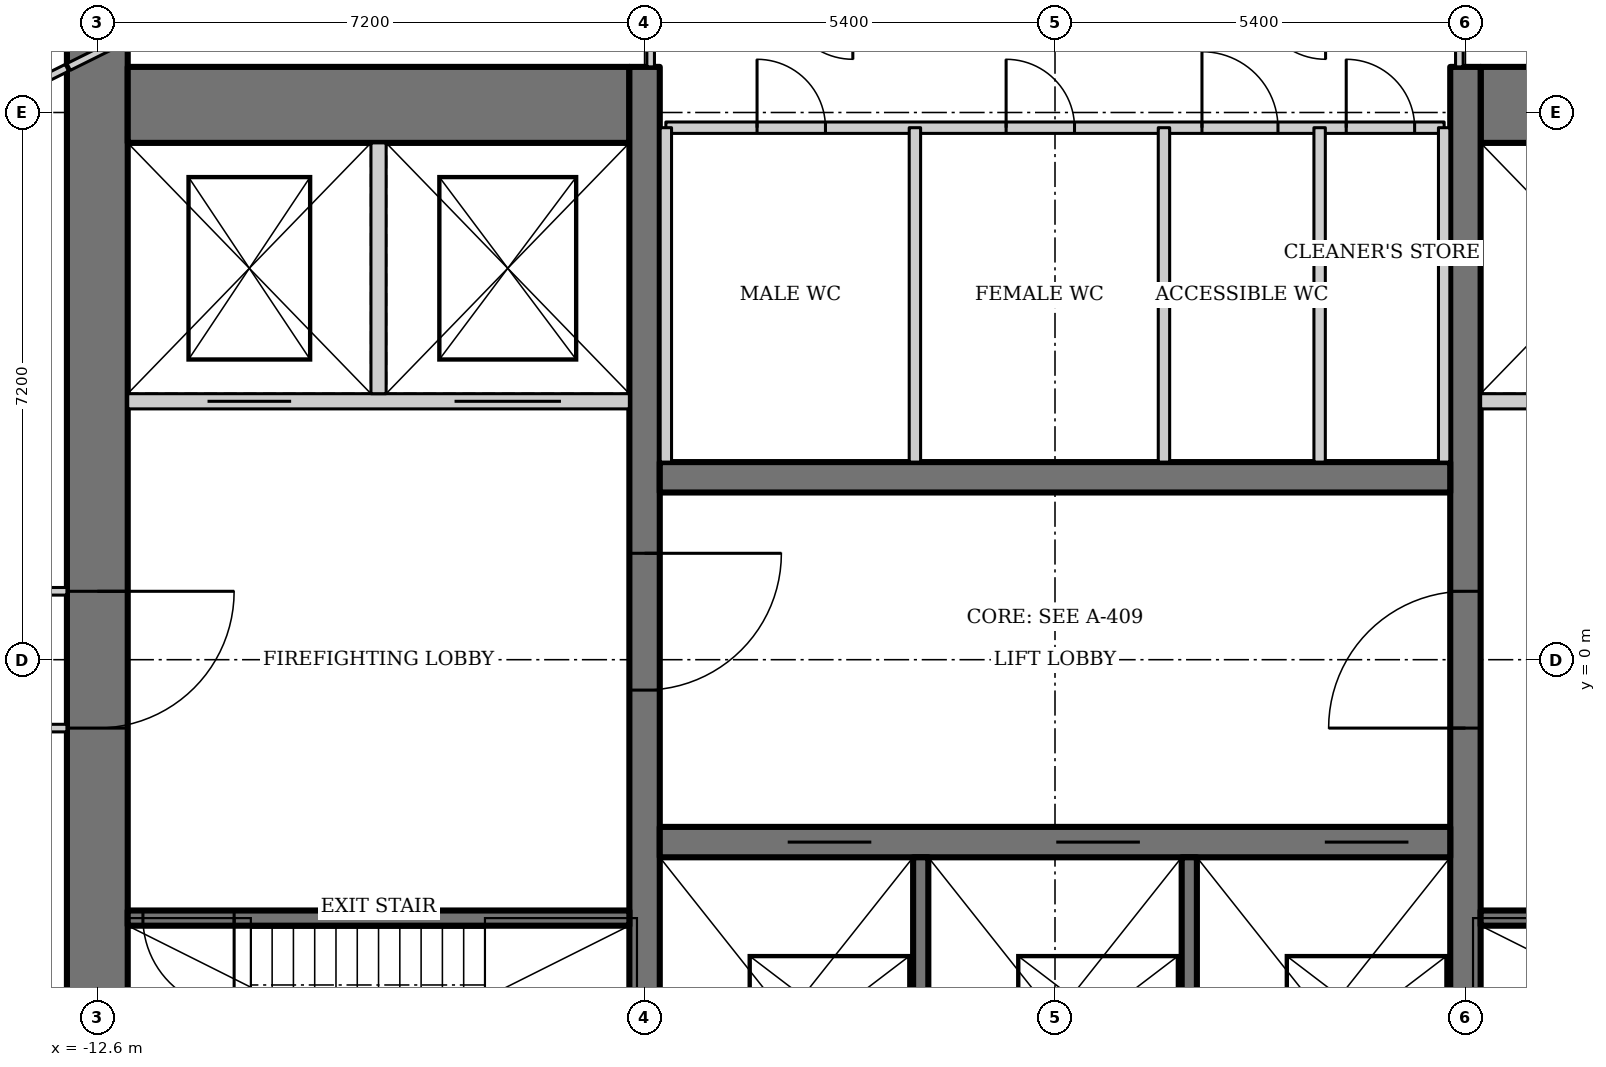
"""IFC4 building model, lengths in metres.
Left out: names, types, materials, properties, quantities, classifications, styles, units other than length and angle.
Written with IfcOpenShell. Run it as: python <this file> out.ifc"""

import sys

from ifc_helpers import new_model, si_unit, direction, frame, frame_2d, origin, place, context, subcontext, project, spatial, rectangle, extrude, element, fill, save


model = new_model("IFC4")
c1 = context("Model", 3, precision=1e-05, world=origin(), true_north=direction((0.0, 1.0)))
c2 = subcontext(c1, "Body", "Model", "MODEL_VIEW")
j1 = project(units=[si_unit("LENGTHUNIT", "METRE"), si_unit("PLANEANGLEUNIT", "RADIAN")], contexts=[c1])
p1 = place(None, origin())
s1 = spatial("IfcSite", under=j1, at=p1, CompositionType="ELEMENT")
p2 = place(p1, origin())
s2 = spatial("IfcBuilding", under=s1, at=p2, CompositionType="ELEMENT")
p3 = place(p2, frame((0.0, 0.0, 245.2)))
s3 = spatial("IfcBuildingStorey", under=s2, at=p3, CompositionType="ELEMENT", Elevation=245.2)
p4 = place(p3, frame((-12.6, 11.0, 0.0), z_axis=(0.0, 0.0, 1.0), x_axis=(0.0, -1.0, 0.0)))
e1 = element("IfcWall", 1, at=p4, inside=s3, PredefinedType="SHEAR", context=c2, shape_type="SweptSolid", body=[
    extrude(rectangle(XDim=22.0, YDim=0.8, at=frame_2d((11.0, 0.0))), origin(), (0.0, 0.0, 1.0), 4.2),
])
p5 = place(p4, frame((10.1, 0.0, 0.0)))
e2 = element("IfcOpeningElement", 2, at=p5, cuts=e1, PredefinedType="OPENING", context=c2, shape_type="SweptSolid", body=[
    extrude(rectangle(XDim=1.8, YDim=2.1, at=frame_2d((0.9, 1.05))), frame((0.0, 0.41, 0.0), z_axis=(0.0, -1.0, 0.0), x_axis=(1.0, 0.0, 0.0)), (0.0, 0.0, 1.0), 0.82),
])
for number, where, z_axis, x_axis in (
    (3, (12.2, 7.3, 0.0), (0.0, 0.0, 1.0), (-1.0, 0.0, 0.0)),
    (4, (-5.6, 7.3, 0.0), (0.0, 0.0, 1.0), (-1.0, 0.0, 0.0)),
):
    element("IfcWall", number, at=place(p3, frame(where, z_axis=z_axis, x_axis=x_axis)), inside=s3, PredefinedType="SHEAR", context=c2, shape_type="SweptSolid", body=[
        extrude(rectangle(XDim=6.6, YDim=1.0, at=frame_2d((3.3, 0.0))), origin(), (0.0, 0.0, 1.0), 4.2),
    ])
p6 = place(p3, frame((5.4, -6.8, 0.0), z_axis=(0.0, 0.0, 1.0), x_axis=(0.0, 1.0, 0.0)))
e5 = element("IfcWall", 5, at=p6, inside=s3, PredefinedType="SHEAR", context=c2, shape_type="SweptSolid", body=[
    extrude(rectangle(XDim=14.6, YDim=0.4, at=frame_2d((7.3, 0.0))), origin(), (0.0, 0.0, 1.0), 4.2),
])
p7 = place(p6, frame((5.9, 0.0, 0.0)))
e6 = element("IfcOpeningElement", 6, at=p7, cuts=e5, PredefinedType="OPENING", context=c2, shape_type="SweptSolid", body=[
    extrude(rectangle(XDim=1.8, YDim=2.1, at=frame_2d((0.9, 1.05))), frame((0.0, 0.21, 0.0), z_axis=(0.0, -1.0, 0.0), x_axis=(1.0, 0.0, 0.0)), (0.0, 0.0, 1.0), 0.42),
])
p8 = place(p3, frame((-5.4, 7.8, 0.0), z_axis=(0.0, 0.0, 1.0), x_axis=(0.0, -1.0, 0.0)))
e7 = element("IfcWall", 7, at=p8, inside=s3, PredefinedType="SHEAR", context=c2, shape_type="SweptSolid", body=[
    extrude(rectangle(XDim=14.6, YDim=0.4, at=frame_2d((7.3, 0.0))), origin(), (0.0, 0.0, 1.0), 4.2),
])
p9 = place(p8, frame((6.4, 0.0, 0.0)))
e8 = element("IfcOpeningElement", 8, at=p9, cuts=e7, PredefinedType="OPENING", context=c2, shape_type="SweptSolid", body=[
    extrude(rectangle(XDim=1.8, YDim=2.1, at=frame_2d((0.9, 1.05))), frame((0.0, 0.21, 0.0), z_axis=(0.0, -1.0, 0.0), x_axis=(1.0, 0.0, 0.0)), (0.0, 0.0, 1.0), 0.42),
])
p10 = place(p3, frame((-5.2, -2.4, 0.0), z_axis=(0.0, 0.0, 1.0), x_axis=(1.0, 0.0, 0.0)))
e9 = element("IfcWall", 9, at=p10, inside=s3, PredefinedType="SHEAR", context=c2, shape_type="SweptSolid", body=[
    extrude(rectangle(XDim=10.4, YDim=0.4, at=frame_2d((5.2, 0.0))), origin(), (0.0, 0.0, 1.0), 4.2),
])
p11 = place(p10, frame((1.683, 0.0, 0.0)))
e10 = element("IfcOpeningElement", 10, at=p11, cuts=e9, PredefinedType="OPENING", context=c2, shape_type="SweptSolid", body=[
    extrude(rectangle(XDim=1.1, YDim=2.2, at=frame_2d((0.55, 1.1))), frame((0.0, 0.21, 0.0), z_axis=(0.0, -1.0, 0.0), x_axis=(1.0, 0.0, 0.0)), (0.0, 0.0, 1.0), 0.42),
])
p12 = place(p10, frame((5.217, 0.0, 0.0)))
e11 = element("IfcOpeningElement", 11, at=p12, cuts=e9, PredefinedType="OPENING", context=c2, shape_type="SweptSolid", body=[
    extrude(rectangle(XDim=1.1, YDim=2.2, at=frame_2d((0.55, 1.1))), frame((0.0, 0.21, 0.0), z_axis=(0.0, -1.0, 0.0), x_axis=(1.0, 0.0, 0.0)), (0.0, 0.0, 1.0), 0.42),
])
p13 = place(p10, frame((8.75, 0.0, 0.0)))
e12 = element("IfcOpeningElement", 12, at=p13, cuts=e9, PredefinedType="OPENING", context=c2, shape_type="SweptSolid", body=[
    extrude(rectangle(XDim=1.1, YDim=2.2, at=frame_2d((0.55, 1.1))), frame((0.0, 0.21, 0.0), z_axis=(0.0, -1.0, 0.0), x_axis=(1.0, 0.0, 0.0)), (0.0, 0.0, 1.0), 0.42),
])
for number, where, z_axis, x_axis in (
    (13, (-1.767, -2.6, 0.0), (0.0, 0.0, 1.0), (0.0, -1.0, 0.0)),
    (14, (1.767, -2.6, 0.0), (0.0, 0.0, 1.0), (0.0, -1.0, 0.0)),
):
    element("IfcWall", number, at=place(p3, frame(where, z_axis=z_axis, x_axis=x_axis)), inside=s3, PredefinedType="SOLIDWALL", context=c2, shape_type="SweptSolid", body=[
        extrude(rectangle(XDim=4.2, YDim=0.2, at=frame_2d((2.1, 0.0))), origin(), (0.0, 0.0, 1.0), 4.2),
    ])
p14 = place(p3, frame((5.2, 2.4, 0.0), z_axis=(0.0, 0.0, 1.0), x_axis=(-1.0, 0.0, 0.0)))
e15 = element("IfcWall", 15, at=p14, inside=s3, PredefinedType="SHEAR", context=c2, shape_type="SweptSolid", body=[
    extrude(rectangle(XDim=10.4, YDim=0.4, at=frame_2d((5.2, 0.0))), origin(), (0.0, 0.0, 1.0), 4.2),
])
p15 = place(p3, frame((5.6, -3.4, 0.0), z_axis=(0.0, 0.0, 1.0), x_axis=(1.0, 0.0, 0.0)))
e16 = element("IfcWall", 16, at=p15, inside=s3, PredefinedType="SHEAR", context=c2, shape_type="SweptSolid", body=[
    extrude(rectangle(XDim=6.6, YDim=0.2, at=frame_2d((3.3, 0.0))), origin(), (0.0, 0.0, 1.0), 4.2),
])
p16 = place(p15, frame((5.2, 0.0, 0.0)))
e17 = element("IfcOpeningElement", 17, at=p16, cuts=e16, PredefinedType="OPENING", context=c2, shape_type="SweptSolid", body=[
    extrude(rectangle(XDim=1.2, YDim=2.1, at=frame_2d((0.6, 1.05))), frame((0.0, 0.11, 0.0), z_axis=(0.0, -1.0, 0.0), x_axis=(1.0, 0.0, 0.0)), (0.0, 0.0, 1.0), 0.22),
])
p17 = place(p3, frame((12.2, 3.4, 0.0), z_axis=(0.0, 0.0, 1.0), x_axis=(-1.0, 0.0, 0.0)))
e18 = element("IfcWall", 18, at=p17, inside=s3, PredefinedType="SOLIDWALL", context=c2, shape_type="SweptSolid", body=[
    extrude(rectangle(XDim=6.6, YDim=0.2, at=frame_2d((3.3, 0.0))), origin(), (0.0, 0.0, 1.0), 4.2),
])
p18 = place(p17, frame((4.45, 0.0, 0.0)))
e19 = element("IfcOpeningElement", 19, at=p18, cuts=e18, PredefinedType="OPENING", context=c2, shape_type="SweptSolid", body=[
    extrude(rectangle(XDim=1.1, YDim=2.2, at=frame_2d((0.55, 1.1))), frame((0.0, 0.11, 0.0), z_axis=(0.0, -1.0, 0.0), x_axis=(1.0, 0.0, 0.0)), (0.0, 0.0, 1.0), 0.22),
])
p19 = place(p17, frame((0.9, 0.0, 0.0)))
e20 = element("IfcOpeningElement", 20, at=p19, cuts=e18, PredefinedType="OPENING", context=c2, shape_type="SweptSolid", body=[
    extrude(rectangle(XDim=1.4, YDim=2.2, at=frame_2d((0.7, 1.1))), frame((0.0, 0.11, 0.0), z_axis=(0.0, -1.0, 0.0), x_axis=(1.0, 0.0, 0.0)), (0.0, 0.0, 1.0), 0.22),
])
p20 = place(p3, frame((-5.6, -3.4, 0.0), z_axis=(0.0, 0.0, 1.0), x_axis=(-1.0, 0.0, 0.0)))
e21 = element("IfcWall", 21, at=p20, inside=s3, PredefinedType="SHEAR", context=c2, shape_type="SweptSolid", body=[
    extrude(rectangle(XDim=6.6, YDim=0.2, at=frame_2d((3.3, 0.0))), origin(), (0.0, 0.0, 1.0), 4.2),
])
p21 = place(p20, frame((5.2, 0.0, 0.0)))
e22 = element("IfcOpeningElement", 22, at=p21, cuts=e21, PredefinedType="OPENING", context=c2, shape_type="SweptSolid", body=[
    extrude(rectangle(XDim=1.2, YDim=2.1, at=frame_2d((0.6, 1.05))), frame((0.0, 0.11, 0.0), z_axis=(0.0, -1.0, 0.0), x_axis=(1.0, 0.0, 0.0)), (0.0, 0.0, 1.0), 0.22),
])
p22 = place(p3, frame((-12.2, 3.4, 0.0), z_axis=(0.0, 0.0, 1.0), x_axis=(1.0, 0.0, 0.0)))
e23 = element("IfcWall", 23, at=p22, inside=s3, PredefinedType="SOLIDWALL", context=c2, shape_type="SweptSolid", body=[
    extrude(rectangle(XDim=6.6, YDim=0.2, at=frame_2d((3.3, 0.0))), origin(), (0.0, 0.0, 1.0), 4.2),
])
p23 = place(p22, frame((1.05, 0.0, 0.0)))
e24 = element("IfcOpeningElement", 24, at=p23, cuts=e23, PredefinedType="OPENING", context=c2, shape_type="SweptSolid", body=[
    extrude(rectangle(XDim=1.1, YDim=2.2, at=frame_2d((0.55, 1.1))), frame((0.0, 0.11, 0.0), z_axis=(0.0, -1.0, 0.0), x_axis=(1.0, 0.0, 0.0)), (0.0, 0.0, 1.0), 0.22),
])
p24 = place(p22, frame((4.3, 0.0, 0.0)))
e25 = element("IfcOpeningElement", 25, at=p24, cuts=e23, PredefinedType="OPENING", context=c2, shape_type="SweptSolid", body=[
    extrude(rectangle(XDim=1.4, YDim=2.2, at=frame_2d((0.7, 1.1))), frame((0.0, 0.11, 0.0), z_axis=(0.0, -1.0, 0.0), x_axis=(1.0, 0.0, 0.0)), (0.0, 0.0, 1.0), 0.22),
])
p25 = place(p3, frame((-8.9, 3.5, 0.0), z_axis=(0.0, 0.0, 1.0), x_axis=(0.0, 1.0, 0.0)))
e26 = element("IfcWall", 26, at=p25, inside=s3, PredefinedType="SOLIDWALL", context=c2, shape_type="SweptSolid", body=[
    extrude(rectangle(XDim=3.3, YDim=0.2, at=frame_2d((1.65, 0.0))), origin(), (0.0, 0.0, 1.0), 4.2),
])
p26 = place(p3, frame((-5.12, 7.0, 0.0), z_axis=(0.0, 0.0, 1.0), x_axis=(1.0, 0.0, 0.0)))
e27 = element("IfcWall", 27, at=p26, inside=s3, PredefinedType="SOLIDWALL", context=c2, shape_type="SweptSolid", body=[
    extrude(rectangle(XDim=10.24, YDim=0.15, at=frame_2d((5.12, 0.0))), origin(), (0.0, 0.0, 1.0), 4.05),
])
p27 = place(p26, frame((1.2, 0.0, 0.0)))
e28 = element("IfcOpeningElement", 28, at=p27, cuts=e27, PredefinedType="OPENING", context=c2, shape_type="SweptSolid", body=[
    extrude(rectangle(XDim=0.9, YDim=2.1, at=frame_2d((0.45, 1.05))), frame((0.0, 0.085, 0.0), z_axis=(0.0, -1.0, 0.0), x_axis=(1.0, 0.0, 0.0)), (0.0, 0.0, 1.0), 0.17),
])
p28 = place(p26, frame((4.477, 0.0, 0.0)))
e29 = element("IfcOpeningElement", 29, at=p28, cuts=e27, PredefinedType="OPENING", context=c2, shape_type="SweptSolid", body=[
    extrude(rectangle(XDim=0.9, YDim=2.1, at=frame_2d((0.45, 1.05))), frame((0.0, 0.085, 0.0), z_axis=(0.0, -1.0, 0.0), x_axis=(1.0, 0.0, 0.0)), (0.0, 0.0, 1.0), 0.17),
])
p29 = place(p26, frame((7.054, 0.0, 0.0)))
e30 = element("IfcOpeningElement", 30, at=p29, cuts=e27, PredefinedType="OPENING", context=c2, shape_type="SweptSolid", body=[
    extrude(rectangle(XDim=1.0, YDim=2.1, at=frame_2d((0.5, 1.05))), frame((0.0, 0.085, 0.0), z_axis=(0.0, -1.0, 0.0), x_axis=(1.0, 0.0, 0.0)), (0.0, 0.0, 1.0), 0.17),
])
p30 = place(p26, frame((8.952, 0.0, 0.0)))
e31 = element("IfcOpeningElement", 31, at=p30, cuts=e27, PredefinedType="OPENING", context=c2, shape_type="SweptSolid", body=[
    extrude(rectangle(XDim=0.9, YDim=2.1, at=frame_2d((0.45, 1.05))), frame((0.0, 0.085, 0.0), z_axis=(0.0, -1.0, 0.0), x_axis=(1.0, 0.0, 0.0)), (0.0, 0.0, 1.0), 0.17),
])
for number, where, z_axis, x_axis in (
    (32, (-5.12, 2.6, 0.0), (0.0, 0.0, 1.0), (0.0, 1.0, 0.0)),
    (33, (5.12, 2.6, 0.0), (0.0, 0.0, 1.0), (0.0, 1.0, 0.0)),
    (34, (-1.843, 2.6, 0.0), (0.0, 0.0, 1.0), (0.0, 1.0, 0.0)),
):
    element("IfcWall", number, at=place(p3, frame(where, z_axis=z_axis, x_axis=x_axis)), inside=s3, PredefinedType="SOLIDWALL", context=c2, shape_type="SweptSolid", body=[
        extrude(rectangle(XDim=4.4, YDim=0.15, at=frame_2d((2.2, 0.0))), origin(), (0.0, 0.0, 1.0), 4.05),
    ])
p31 = place(p3, frame((1.434, 2.6, 0.0), z_axis=(0.0, 0.0, 1.0), x_axis=(0.0, 1.0, 0.0)))
e35 = element("IfcWall", 35, at=p31, inside=s3, PredefinedType="SOLIDWALL", context=c2, shape_type="SweptSolid", body=[
    extrude(rectangle(XDim=4.4, YDim=0.15, at=frame_2d((2.2, 0.0))), origin(), (0.0, 0.0, 1.0), 3.108),
])
p32 = place(p3, frame((3.482, 2.6, 0.0), z_axis=(0.0, 0.0, 1.0), x_axis=(0.0, 1.0, 0.0)))
e36 = element("IfcWall", 36, at=p32, inside=s3, PredefinedType="SOLIDWALL", context=c2, shape_type="SweptSolid", body=[
    extrude(rectangle(XDim=4.4, YDim=0.15, at=frame_2d((2.2, 0.0))), origin(), (0.0, 0.0, 1.0), 4.05),
])
p33 = place(p3, frame((5.32, 7.8, 0.0), z_axis=(0.0, 0.0, 1.0), x_axis=(0.0, 1.0, 0.0)))
e37 = element("IfcWall", 37, at=p33, inside=s3, PredefinedType="PARTITIONING", context=c2, shape_type="SweptSolid", body=[
    extrude(rectangle(XDim=1.0, YDim=0.1, at=frame_2d((0.5, 0.0))), origin(), (0.0, 0.0, 1.0), 4.05),
])
p34 = place(p3, frame((-12.977, 7.8, 0.0), z_axis=(0.0, 0.0, 1.0), x_axis=(0.895529831139, 0.445001484874, 0.0)))
e38 = element("IfcWall", 38, at=p34, inside=s3, PredefinedType="PARTITIONING", context=c2, shape_type="SweptSolid", body=[
    extrude(rectangle(XDim=4.108, YDim=0.1, at=frame_2d((2.054, 0.0))), origin(), (0.0, 0.0, 1.0), 4.05),
])
p35 = place(p3, frame((-5.32, 8.8, 0.0), z_axis=(0.0, 0.0, 1.0), x_axis=(0.0, -1.0, 0.0)))
e39 = element("IfcWall", 39, at=p35, inside=s3, PredefinedType="PARTITIONING", context=c2, shape_type="SweptSolid", body=[
    extrude(rectangle(XDim=1.0, YDim=0.1, at=frame_2d((0.5, 0.0))), origin(), (0.0, 0.0, 1.0), 4.05),
])
p36 = place(p3, frame((-13.337, 7.621, 0.0), z_axis=(0.0, 0.0, 1.0), x_axis=(0.895721570004, 0.444615416995, 0.0)))
e40 = element("IfcWall", 40, at=p36, inside=s3, PredefinedType="PARTITIONING", context=c2, shape_type="SweptSolid", body=[
    extrude(rectangle(XDim=0.376, YDim=0.1, at=frame_2d((0.188, 0.0))), origin(), (0.0, 0.0, 1.0), 4.05),
])
p37 = place(p3, frame((-15.165, -0.9, 0.0), z_axis=(0.0, 0.0, 1.0), x_axis=(1.0, 0.0, 0.0)))
e41 = element("IfcWall", 41, at=p37, inside=s3, PredefinedType="PARTITIONING", context=c2, shape_type="SweptSolid", body=[
    extrude(rectangle(XDim=2.165, YDim=0.1, at=frame_2d((1.083, 0.0))), origin(), (0.0, 0.0, 1.0), 4.05),
])
p38 = place(p37, frame((0.1, 0.0, 0.0)))
e42 = element("IfcOpeningElement", 42, at=p38, cuts=e41, PredefinedType="OPENING", context=c2, shape_type="SweptSolid", body=[
    extrude(rectangle(XDim=0.9, YDim=2.1, at=frame_2d((0.45, 1.05))), frame((0.0, 0.06, 0.0), z_axis=(0.0, -1.0, 0.0), x_axis=(1.0, 0.0, 0.0)), (0.0, 0.0, 1.0), 0.12),
])
p39 = place(p3, frame((-13.0, 0.9, 0.0), z_axis=(0.0, 0.0, 1.0), x_axis=(-1.0, 0.0, 0.0)))
e43 = element("IfcWall", 43, at=p39, inside=s3, PredefinedType="PARTITIONING", context=c2, shape_type="SweptSolid", body=[
    extrude(rectangle(XDim=2.165, YDim=0.1, at=frame_2d((1.083, 0.0))), origin(), (0.0, 0.0, 1.0), 4.05),
])
p40 = place(p39, frame((1.15, 0.0, 0.0)))
e44 = element("IfcOpeningElement", 44, at=p40, cuts=e43, PredefinedType="OPENING", context=c2, shape_type="SweptSolid", body=[
    extrude(rectangle(XDim=0.9, YDim=2.1, at=frame_2d((0.45, 1.05))), frame((0.0, 0.06, 0.0), z_axis=(0.0, -1.0, 0.0), x_axis=(1.0, 0.0, 0.0)), (0.0, 0.0, 1.0), 0.12),
])
p41 = place(p7, origin())
e45 = element("IfcDoor", 45, at=p41, inside=s3, OperationType="DOUBLE_DOOR_DOUBLE_SWING", PredefinedType="DOOR", context=c2, shape_type="SweptSolid", body=[
    extrude(rectangle(XDim=1.8, YDim=2.1, at=frame_2d((0.9, 1.05))), frame((0.0, 0.025, 0.0), z_axis=(0.0, -1.0, 0.0), x_axis=(1.0, 0.0, 0.0)), (0.0, 0.0, 1.0), 0.05),
])
fill(e6, e45)
p42 = place(p9, origin())
e46 = element("IfcDoor", 46, at=p42, inside=s3, OperationType="DOUBLE_DOOR_DOUBLE_SWING", PredefinedType="DOOR", context=c2, shape_type="SweptSolid", body=[
    extrude(rectangle(XDim=1.8, YDim=2.1, at=frame_2d((0.9, 1.05))), frame((0.0, 0.025, 0.0), z_axis=(0.0, -1.0, 0.0), x_axis=(1.0, 0.0, 0.0)), (0.0, 0.0, 1.0), 0.05),
])
fill(e8, e46)
p43 = place(p21, origin())
e47 = element("IfcDoor", 47, at=p43, inside=s3, OperationType="SINGLE_SWING_RIGHT", PredefinedType="DOOR", context=c2, shape_type="SweptSolid", body=[
    extrude(rectangle(XDim=1.2, YDim=2.1, at=frame_2d((0.6, 1.05))), frame((0.0, 0.025, 0.0), z_axis=(0.0, -1.0, 0.0), x_axis=(1.0, 0.0, 0.0)), (0.0, 0.0, 1.0), 0.05),
])
fill(e22, e47)
p44 = place(p5, origin())
e48 = element("IfcDoor", 48, at=p44, inside=s3, OperationType="DOUBLE_DOOR_DOUBLE_SWING", PredefinedType="DOOR", context=c2, shape_type="SweptSolid", body=[
    extrude(rectangle(XDim=1.8, YDim=2.1, at=frame_2d((0.9, 1.05))), frame((0.0, 0.025, 0.0), z_axis=(0.0, -1.0, 0.0), x_axis=(1.0, 0.0, 0.0)), (0.0, 0.0, 1.0), 0.05),
])
fill(e2, e48)
p45 = place(p11, origin())
e49 = element("IfcDoor", 49, at=p45, inside=s3, OperationType="DOUBLE_DOOR_SLIDING", PredefinedType="DOOR", context=c2, shape_type="SweptSolid", body=[
    extrude(rectangle(XDim=1.1, YDim=2.2, at=frame_2d((0.55, 1.1))), frame((0.0, 0.025, 0.0), z_axis=(0.0, -1.0, 0.0), x_axis=(1.0, 0.0, 0.0)), (0.0, 0.0, 1.0), 0.05),
])
fill(e10, e49)
p46 = place(p12, origin())
e50 = element("IfcDoor", 50, at=p46, inside=s3, OperationType="DOUBLE_DOOR_SLIDING", PredefinedType="DOOR", context=c2, shape_type="SweptSolid", body=[
    extrude(rectangle(XDim=1.1, YDim=2.2, at=frame_2d((0.55, 1.1))), frame((0.0, 0.025, 0.0), z_axis=(0.0, -1.0, 0.0), x_axis=(1.0, 0.0, 0.0)), (0.0, 0.0, 1.0), 0.05),
])
fill(e11, e50)
p47 = place(p13, origin())
e51 = element("IfcDoor", 51, at=p47, inside=s3, OperationType="DOUBLE_DOOR_SLIDING", PredefinedType="DOOR", context=c2, shape_type="SweptSolid", body=[
    extrude(rectangle(XDim=1.1, YDim=2.2, at=frame_2d((0.55, 1.1))), frame((0.0, 0.025, 0.0), z_axis=(0.0, -1.0, 0.0), x_axis=(1.0, 0.0, 0.0)), (0.0, 0.0, 1.0), 0.05),
])
fill(e12, e51)
p48 = place(p23, origin())
e52 = element("IfcDoor", 52, at=p48, inside=s3, OperationType="DOUBLE_DOOR_SLIDING", PredefinedType="DOOR", context=c2, shape_type="SweptSolid", body=[
    extrude(rectangle(XDim=1.1, YDim=2.2, at=frame_2d((0.55, 1.1))), frame((0.0, 0.025, 0.0), z_axis=(0.0, -1.0, 0.0), x_axis=(1.0, 0.0, 0.0)), (0.0, 0.0, 1.0), 0.05),
])
fill(e24, e52)
p49 = place(p24, origin())
e53 = element("IfcDoor", 53, at=p49, inside=s3, OperationType="DOUBLE_DOOR_SLIDING", PredefinedType="DOOR", context=c2, shape_type="SweptSolid", body=[
    extrude(rectangle(XDim=1.4, YDim=2.2, at=frame_2d((0.7, 1.1))), frame((0.0, 0.025, 0.0), z_axis=(0.0, -1.0, 0.0), x_axis=(1.0, 0.0, 0.0)), (0.0, 0.0, 1.0), 0.05),
])
fill(e25, e53)
p50 = place(p27, origin())
e54 = element("IfcDoor", 54, at=p50, inside=s3, OperationType="SINGLE_SWING_LEFT", PredefinedType="DOOR", context=c2, shape_type="SweptSolid", body=[
    extrude(rectangle(XDim=0.9, YDim=2.1, at=frame_2d((0.45, 1.05))), frame((0.0, 0.025, 0.0), z_axis=(0.0, -1.0, 0.0), x_axis=(1.0, 0.0, 0.0)), (0.0, 0.0, 1.0), 0.05),
])
fill(e28, e54)
p51 = place(p28, origin())
e55 = element("IfcDoor", 55, at=p51, inside=s3, OperationType="SINGLE_SWING_LEFT", PredefinedType="DOOR", context=c2, shape_type="SweptSolid", body=[
    extrude(rectangle(XDim=0.9, YDim=2.1, at=frame_2d((0.45, 1.05))), frame((0.0, 0.025, 0.0), z_axis=(0.0, -1.0, 0.0), x_axis=(1.0, 0.0, 0.0)), (0.0, 0.0, 1.0), 0.05),
])
fill(e29, e55)
p52 = place(p29, origin())
e56 = element("IfcDoor", 56, at=p52, inside=s3, OperationType="SINGLE_SWING_LEFT", PredefinedType="DOOR", context=c2, shape_type="SweptSolid", body=[
    extrude(rectangle(XDim=1.0, YDim=2.1, at=frame_2d((0.5, 1.05))), frame((0.0, 0.025, 0.0), z_axis=(0.0, -1.0, 0.0), x_axis=(1.0, 0.0, 0.0)), (0.0, 0.0, 1.0), 0.05),
])
fill(e30, e56)
p53 = place(p30, origin())
e57 = element("IfcDoor", 57, at=p53, inside=s3, OperationType="SINGLE_SWING_LEFT", PredefinedType="DOOR", context=c2, shape_type="SweptSolid", body=[
    extrude(rectangle(XDim=0.9, YDim=2.1, at=frame_2d((0.45, 1.05))), frame((0.0, 0.025, 0.0), z_axis=(0.0, -1.0, 0.0), x_axis=(1.0, 0.0, 0.0)), (0.0, 0.0, 1.0), 0.05),
])
fill(e31, e57)
save(model, sys.argv[1])
